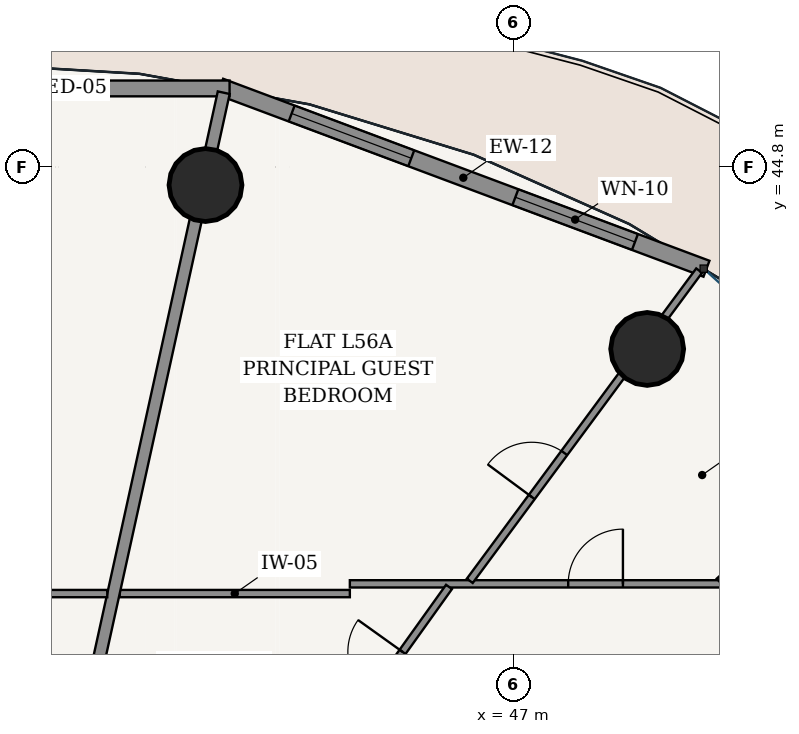
"""IFC4 building model, lengths in metres.
Left out: names, types, materials, properties, quantities, classifications, styles, units other than length and angle.
Written with IfcOpenShell. Run it as: python <this file> out.ifc"""

import sys

from ifc_helpers import new_model, si_unit, direction, frame, frame_2d, origin, origin_2d, place, context, subcontext, project, spatial, rectangle, hollow_circle, extrude, source, transform, mapped, element, fill, save


model = new_model("IFC4")
c1 = context("Model", 3, precision=1e-05, world=origin(), true_north=direction((-0.2419218956, 0.970295726276)))
c2 = subcontext(c1, "Body", "Model", "MODEL_VIEW")
j1 = project(units=[si_unit("LENGTHUNIT", "METRE"), si_unit("PLANEANGLEUNIT", "RADIAN")], contexts=[c1])
p1 = place(None, origin())
s1 = spatial("IfcSite", under=j1, at=p1, CompositionType="ELEMENT")
p2 = place(p1, origin())
s2 = spatial("IfcBuilding", under=s1, at=p2, CompositionType="ELEMENT")
p3 = place(p2, frame((0.0, 0.0, 213.4)))
s3 = spatial("IfcBuildingStorey", under=s2, at=p3, CompositionType="ELEMENT", Elevation=213.4)
for number, where, z_axis, x_axis in (
    (1, (49.195, 41.808, 0.0), (0.0, 0.0, 1.0), (1.0, 0.0, 0.0)),
    (2, (41.931, 44.503, 0.0), (0.0, 0.0, 1.0), (1.0, 0.0, 0.0)),
):
    element("IfcColumn", number, at=place(p3, frame(where, z_axis=z_axis, x_axis=x_axis)), inside=s3, PredefinedType="COLUMN", context=c2, shape_type="SweptSolid", body=[
        extrude(hollow_circle(Radius=0.6, WallThickness=0.038, at=origin_2d()), origin(), (0.0, 0.0, 1.0), 3.7),
    ])
p4 = place(p3, frame((50.17, 43.127, 0.0), z_axis=(0.0, 0.0, 1.0), x_axis=(-0.936556918375, 0.350515532672, 0.0)))
e3 = element("IfcWall", 3, at=p4, inside=s3, PredefinedType="SOLIDWALL", context=c2, shape_type="SweptSolid", body=[
    extrude(rectangle(XDim=8.539, YDim=0.28, at=frame_2d((4.27, 0.0))), origin(), (0.0, 0.0, 1.0), 3.435),
])
p5 = place(p4, frame((1.256, 0.0, 0.85)))
e4 = element("IfcOpeningElement", 4, at=p5, cuts=e3, PredefinedType="OPENING", context=c2, shape_type="SweptSolid", body=[
    extrude(rectangle(XDim=2.1, YDim=1.95, at=frame_2d((1.05, 0.975))), frame((0.0, 0.15, 0.0), z_axis=(0.0, -1.0, 0.0), x_axis=(1.0, 0.0, 0.0)), (0.0, 0.0, 1.0), 0.3),
])
p6 = place(p4, frame((5.184, 0.0, 0.85)))
e5 = element("IfcOpeningElement", 5, at=p6, cuts=e3, PredefinedType="OPENING", context=c2, shape_type="SweptSolid", body=[
    extrude(rectangle(XDim=2.1, YDim=1.95, at=frame_2d((1.05, 0.975))), frame((0.0, 0.15, 0.0), z_axis=(0.0, -1.0, 0.0), x_axis=(1.0, 0.0, 0.0)), (0.0, 0.0, 1.0), 0.3),
])
p7 = place(p3, frame((42.327, 46.092, 0.0), z_axis=(0.0, 0.0, 1.0), x_axis=(-1.0, 0.0, 0.0)))
e6 = element("IfcWall", 6, at=p7, inside=s3, PredefinedType="SOLIDWALL", context=c2, shape_type="SweptSolid", body=[
    extrude(rectangle(XDim=8.654, YDim=0.26, at=frame_2d((4.327, 0.0))), origin(), (0.0, 0.0, 1.0), 3.435),
])
p8 = place(p7, frame((3.652, 0.0, 0.0)))
e7 = element("IfcOpeningElement", 7, at=p8, cuts=e6, PredefinedType="OPENING", context=c2, shape_type="SweptSolid", body=[
    extrude(rectangle(XDim=1.35, YDim=2.2, at=frame_2d((0.675, 1.1))), frame((0.0, 0.14, 0.0), z_axis=(0.0, -1.0, 0.0), x_axis=(1.0, 0.0, 0.0)), (0.0, 0.0, 1.0), 0.28),
])
p9 = place(p3, frame((40.52, 37.785, 0.0), z_axis=(0.0, 0.0, 1.0), x_axis=(1.0, 0.0, 0.0)))
e8 = element("IfcWall", 8, at=p9, inside=s3, PredefinedType="PARTITIONING", context=c2, shape_type="SweptSolid", body=[
    extrude(rectangle(XDim=3.785, YDim=0.12, at=frame_2d((1.893, 0.0))), origin(), (0.0, 0.0, 1.0), 2.951),
])
p10 = place(p3, frame((44.305, 37.945, 0.0), z_axis=(0.0, 0.0, 1.0), x_axis=(1.0, 0.0, 0.0)))
e9 = element("IfcWall", 9, at=p10, inside=s3, PredefinedType="PARTITIONING", context=c2, shape_type="SweptSolid", body=[
    extrude(rectangle(XDim=7.69, YDim=0.12, at=frame_2d((3.845, 0.0))), origin(), (0.0, 0.0, 1.0), 2.951),
])
p11 = place(p10, frame((3.591, 0.0, 0.0)))
e10 = element("IfcOpeningElement", 10, at=p11, cuts=e9, PredefinedType="OPENING", context=c2, shape_type="SweptSolid", body=[
    extrude(rectangle(XDim=0.9, YDim=2.15, at=frame_2d((0.45, 1.075))), frame((0.0, 0.07, 0.0), z_axis=(0.0, -1.0, 0.0), x_axis=(1.0, 0.0, 0.0)), (0.0, 0.0, 1.0), 0.14),
])
p12 = place(p3, frame((50.379, 37.987, 0.0), z_axis=(0.0, 0.0, 1.0), x_axis=(0.741946116474, 0.67045951425, 0.0)))
e11 = element("IfcWall", 11, at=p12, inside=s3, PredefinedType="PARTITIONING", context=c2, shape_type="SweptSolid", body=[
    extrude(rectangle(XDim=4.03, YDim=0.12, at=frame_2d((2.015, 0.0))), origin(), (0.0, 0.0, 1.0), 2.951),
])
p13 = place(p3, frame((46.278, 37.995, 0.0), z_axis=(0.0, 0.0, 1.0), x_axis=(0.594518724985, 0.80408176552, 0.0)))
e12 = element("IfcWall", 12, at=p13, inside=s3, PredefinedType="PARTITIONING", context=c2, shape_type="SweptSolid", body=[
    extrude(rectangle(XDim=6.344, YDim=0.12, at=frame_2d((3.172, 0.0))), origin(), (0.0, 0.0, 1.0), 2.951),
])
p14 = place(p13, frame((1.715, 0.0, 0.0)))
e13 = element("IfcOpeningElement", 13, at=p14, cuts=e12, PredefinedType="OPENING", context=c2, shape_type="SweptSolid", body=[
    extrude(rectangle(XDim=0.9, YDim=2.15, at=frame_2d((0.45, 1.075))), frame((0.0, 0.07, 0.0), z_axis=(0.0, -1.0, 0.0), x_axis=(1.0, 0.0, 0.0)), (0.0, 0.0, 1.0), 0.14),
])
p15 = place(p3, frame((43.885, 35.027, 0.0), z_axis=(0.0, 0.0, 1.0), x_axis=(0.581801309538, 0.813330951225, 0.0)))
e14 = element("IfcWall", 14, at=p15, inside=s3, PredefinedType="PARTITIONING", context=c2, shape_type="SweptSolid", body=[
    extrude(rectangle(XDim=3.526, YDim=0.12, at=frame_2d((1.763, 0.0))), origin(), (0.0, 0.0, 1.0), 3.435),
])
p16 = place(p15, frame((1.313, 0.0, 0.0)))
e15 = element("IfcOpeningElement", 15, at=p16, cuts=e14, PredefinedType="OPENING", context=c2, shape_type="SweptSolid", body=[
    extrude(rectangle(XDim=0.9, YDim=2.15, at=frame_2d((0.45, 1.075))), frame((0.0, 0.07, 0.0), z_axis=(0.0, -1.0, 0.0), x_axis=(1.0, 0.0, 0.0)), (0.0, 0.0, 1.0), 0.14),
])
p17 = place(p3, frame((39.811, 35.027, 0.0), z_axis=(0.0, 0.0, 1.0), x_axis=(0.214966857327, 0.976621344356, 0.0)))
e16 = element("IfcWall", 16, at=p17, inside=s3, PredefinedType="PARTITIONING", context=c2, shape_type="SweptSolid", body=[
    extrude(rectangle(XDim=11.258, YDim=0.2, at=frame_2d((5.629, 0.0))), origin(), (0.0, 0.0, 1.0), 2.52),
])
p18 = place(p3, frame((31.695, 37.785, 0.0), z_axis=(0.0, 0.0, 1.0), x_axis=(1.0, 0.0, 0.0)))
e17 = element("IfcWall", 17, at=p18, inside=s3, PredefinedType="PARTITIONING", context=c2, shape_type="SweptSolid", body=[
    extrude(rectangle(XDim=8.621, YDim=0.12, at=frame_2d((4.311, 0.0))), origin(), (0.0, 0.0, 1.0), 2.951),
])
p19 = place(p18, frame((1.716, 0.0, 0.0)))
e18 = element("IfcOpeningElement", 18, at=p19, cuts=e17, PredefinedType="OPENING", context=c2, shape_type="SweptSolid", body=[
    extrude(rectangle(XDim=0.9, YDim=2.15, at=frame_2d((0.45, 1.075))), frame((0.0, 0.07, 0.0), z_axis=(0.0, -1.0, 0.0), x_axis=(1.0, 0.0, 0.0)), (0.0, 0.0, 1.0), 0.14),
])
p20 = place(p18, frame((5.784, 0.0, 0.0)))
e19 = element("IfcOpeningElement", 19, at=p20, cuts=e17, PredefinedType="OPENING", context=c2, shape_type="SweptSolid", body=[
    extrude(rectangle(XDim=0.9, YDim=2.15, at=frame_2d((0.45, 1.075))), frame((0.0, 0.07, 0.0), z_axis=(0.0, -1.0, 0.0), x_axis=(1.0, 0.0, 0.0)), (0.0, 0.0, 1.0), 0.14),
])
m1 = source(origin(), c2, "Body", "SweptSolid", [
    extrude(rectangle(XDim=2.1, YDim=1.95, at=frame_2d((1.05, 0.975))), frame((0.0, 0.03, 0.0), z_axis=(0.0, -1.0, 0.0), x_axis=(1.0, 0.0, 0.0)), (0.0, 0.0, 1.0), 0.06),
])
p21 = place(p5, origin())
e20 = element("IfcWindow", 20, at=p21, inside=s3, PartitioningType="SINGLE_PANEL", PredefinedType="WINDOW", context=c2, shape_type="MappedRepresentation", body=[
    mapped(m1, transform((0.0, 0.0, 0.0), scale=1.0)),
])
fill(e4, e20)
p22 = place(p6, origin())
e21 = element("IfcWindow", 21, at=p22, inside=s3, PartitioningType="SINGLE_PANEL", PredefinedType="WINDOW", context=c2, shape_type="MappedRepresentation", body=[
    mapped(m1, transform((0.0, 0.0, 0.0), scale=1.0)),
])
fill(e5, e21)
m2 = source(origin(), c2, "Body", "SweptSolid", [
    extrude(rectangle(XDim=0.9, YDim=2.15, at=frame_2d((0.45, 1.075))), frame((0.0, 0.025, 0.0), z_axis=(0.0, -1.0, 0.0), x_axis=(1.0, 0.0, 0.0)), (0.0, 0.0, 1.0), 0.05),
])
p23 = place(p16, origin())
e22 = element("IfcDoor", 22, at=p23, inside=s3, OperationType="SINGLE_SWING_RIGHT", PredefinedType="DOOR", context=c2, shape_type="MappedRepresentation", body=[
    mapped(m2, transform((0.0, 0.0, 0.0), scale=1.0)),
])
fill(e15, e22)
p24 = place(p11, origin())
e23 = element("IfcDoor", 23, at=p24, inside=s3, OperationType="SINGLE_SWING_RIGHT", PredefinedType="DOOR", context=c2, shape_type="MappedRepresentation", body=[
    mapped(m2, transform((0.0, 0.0, 0.0), scale=1.0)),
])
fill(e10, e23)
p25 = place(p14, origin())
e24 = element("IfcDoor", 24, at=p25, inside=s3, OperationType="SINGLE_SWING_LEFT", PredefinedType="DOOR", context=c2, shape_type="MappedRepresentation", body=[
    mapped(m2, transform((0.0, 0.0, 0.0), scale=1.0)),
])
fill(e13, e24)
save(model, sys.argv[1])
